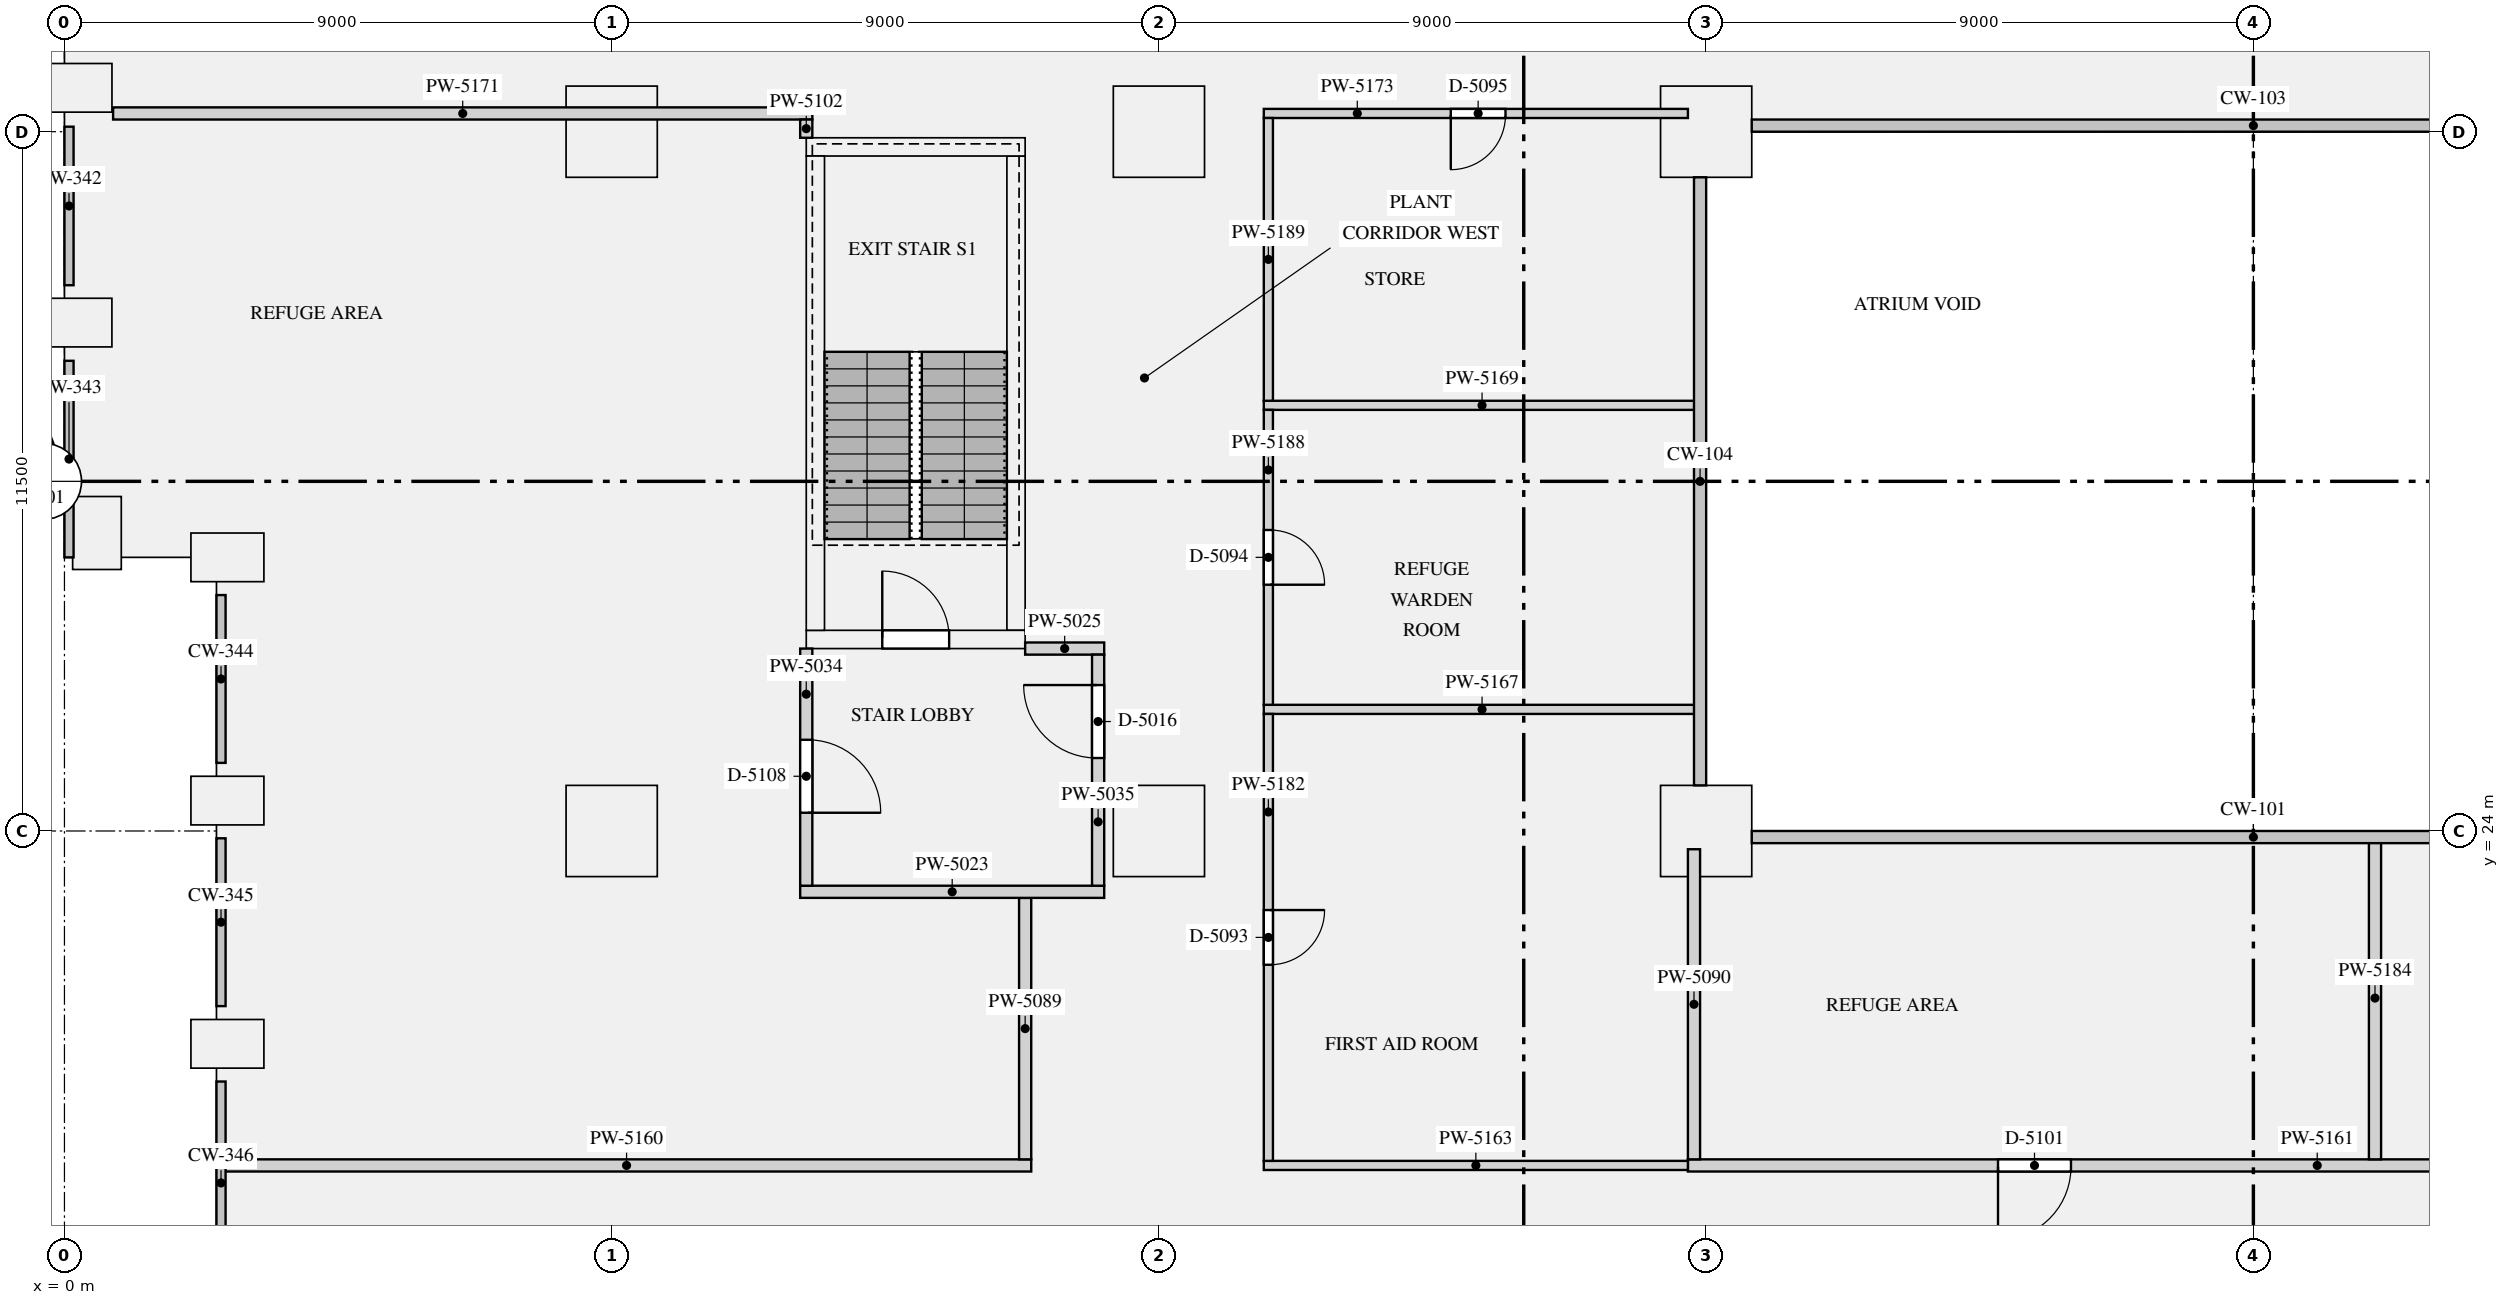
"""IFC4 building model, lengths in metres.
Left out: names, types, materials, properties, quantities, classifications, styles, units other than length and angle.
Written with IfcOpenShell. Run it as: python <this file> out.ifc"""

import sys

from ifc_helpers import new_model, si_unit, direction, frame, frame_2d, origin, origin_2d, place, context, subcontext, project, spatial, rectangle, extrude, element, fill, save


model = new_model("IFC4")
c1 = context("Model", 3, precision=1e-05, world=origin(), true_north=direction((0.0, 1.0)))
c2 = subcontext(c1, "Body", "Model", "MODEL_VIEW")
j1 = project(units=[si_unit("LENGTHUNIT", "METRE"), si_unit("PLANEANGLEUNIT", "RADIAN")], contexts=[c1])
p1 = place(None, origin())
s1 = spatial("IfcSite", under=j1, at=p1, CompositionType="ELEMENT")
p2 = place(p1, origin())
s2 = spatial("IfcBuilding", under=s1, at=p2, CompositionType="ELEMENT")
p3 = place(p2, frame((0.0, 0.0, 73.05)))
s3 = spatial("IfcBuildingStorey", under=s2, at=p3, CompositionType="ELEMENT", Elevation=73.05)
p4 = place(p3, frame((0.181, 36.221, -0.205), z_axis=(0.725881351267, 0.094569334257, 0.681287681454), x_axis=(-0.129190295435, 0.991619820075, 0.0)))
e1 = element("IfcColumn", 1, at=p4, inside=s3, PredefinedType="USERDEFINED", context=c2, shape_type="SweptSolid", body=[
    extrude(rectangle(XDim=1.2, YDim=0.8, at=origin_2d()), origin(), (0.0, 0.0, 1.0), 6.033),
])
p5 = place(p3, frame((0.18, 32.361, -0.206), z_axis=(0.728335596201, 0.047524851396, 0.683570514143), x_axis=(-0.065112840162, 0.997877907384, 0.0)))
e2 = element("IfcColumn", 2, at=p5, inside=s3, PredefinedType="USERDEFINED", context=c2, shape_type="SweptSolid", body=[
    extrude(rectangle(XDim=1.2, YDim=0.8, at=origin_2d()), origin(), (0.0, 0.0, 1.0), 6.016),
])
p6 = place(p3, frame((0.535, 28.9, -0.062), z_axis=(0.727229501578, -0.004075956346, 0.686382283144), x_axis=(-0.68637150257, 0.003846956532, 0.727240923894)))
e3 = element("IfcColumn", 3, at=p6, inside=s3, PredefinedType="USERDEFINED", context=c2, shape_type="SweptSolid", body=[
    extrude(rectangle(XDim=1.2, YDim=0.8, at=origin_2d()), origin(), (0.0, 0.0, 1.0), 5.571),
])
for number, where, z_axis, x_axis in (
    (4, (2.68, 28.5, -0.206), (0.729, 0.0, 0.684), (0.0, 1.0, 0.0)),
    (5, (2.68, 24.5, -0.206), (0.729, 0.0, 0.684), (0.0, 1.0, 0.0)),
    (6, (2.68, 20.5, -0.206), (0.729, 0.0, 0.684), (0.0, 1.0, 0.0)),
):
    element("IfcColumn", number, at=place(p3, frame(where, z_axis=z_axis, x_axis=x_axis)), inside=s3, PredefinedType="USERDEFINED", context=c2, shape_type="SweptSolid", body=[
        extrude(rectangle(XDim=1.2, YDim=0.8, at=origin_2d()), origin(), (0.0, 0.0, 1.0), 6.01),
    ])
for number, where, z_axis, x_axis in (
    (7, (9.0, 24.0, 0.0), (0.0, 0.0, 1.0), (1.0, 0.0, 0.0)),
    (8, (18.0, 24.0, 0.0), (0.0, 0.0, 1.0), (1.0, 0.0, 0.0)),
    (9, (27.0, 24.0, 0.0), (0.0, 0.0, 1.0), (1.0, 0.0, 0.0)),
    (10, (9.0, 35.5, 0.0), (0.0, 0.0, 1.0), (1.0, 0.0, 0.0)),
    (11, (18.0, 35.5, 0.0), (0.0, 0.0, 1.0), (1.0, 0.0, 0.0)),
    (12, (27.0, 35.5, 0.0), (0.0, 0.0, 1.0), (1.0, 0.0, 0.0)),
):
    element("IfcColumn", number, at=place(p3, frame(where, z_axis=z_axis, x_axis=x_axis)), inside=s3, PredefinedType="COLUMN", context=c2, shape_type="SweptSolid", body=[
        extrude(rectangle(XDim=1.5, YDim=1.5, at=origin_2d()), origin(), (0.0, 0.0, 1.0), 4.2),
    ])
p7 = place(p3, frame((12.2, 27.15, 0.0), z_axis=(0.0, 0.0, 1.0), x_axis=(1.0, 0.0, 0.0)))
e13 = element("IfcWall", 13, at=p7, inside=s3, PredefinedType="SHEAR", context=c2, shape_type="SweptSolid", body=[
    extrude(rectangle(XDim=3.6, YDim=0.3, at=frame_2d((1.8, 0.0))), origin(), (0.0, 0.0, 1.0), 4.2),
])
p8 = place(p7, frame((1.25, 0.0, 0.0)))
e14 = element("IfcOpeningElement", 14, at=p8, cuts=e13, PredefinedType="OPENING", context=c2, shape_type="SweptSolid", body=[
    extrude(rectangle(XDim=1.1, YDim=2.1, at=frame_2d((0.55, 1.05))), frame((0.0, 0.16, 0.0), z_axis=(0.0, -1.0, 0.0), x_axis=(1.0, 0.0, 0.0)), (0.0, 0.0, 1.0), 0.32),
])
p9 = place(p3, frame((12.2, 35.25, 0.0), z_axis=(0.0, 0.0, 1.0), x_axis=(1.0, 0.0, 0.0)))
e15 = element("IfcWall", 15, at=p9, inside=s3, PredefinedType="SHEAR", context=c2, shape_type="SweptSolid", body=[
    extrude(rectangle(XDim=3.6, YDim=0.3, at=frame_2d((1.8, 0.0))), origin(), (0.0, 0.0, 1.0), 4.2),
])
for number, where, z_axis, x_axis in (
    (16, (12.35, 27.3, 0.0), (0.0, 0.0, 1.0), (0.0, 1.0, 0.0)),
    (17, (15.65, 27.3, 0.0), (0.0, 0.0, 1.0), (0.0, 1.0, 0.0)),
):
    element("IfcWall", number, at=place(p3, frame(where, z_axis=z_axis, x_axis=x_axis)), inside=s3, PredefinedType="SHEAR", context=c2, shape_type="SweptSolid", body=[
        extrude(rectangle(XDim=7.8, YDim=0.3, at=frame_2d((3.9, 0.0))), origin(), (0.0, 0.0, 1.0), 4.2),
    ])
p10 = place(p3, frame((12.1, 23.0, 0.0), z_axis=(0.0, 0.0, 1.0), x_axis=(1.0, 0.0, 0.0)))
e18 = element("IfcWall", 18, at=p10, inside=s3, PredefinedType="PARTITIONING", context=c2, shape_type="SweptSolid", body=[
    extrude(rectangle(XDim=5.0, YDim=0.2, at=frame_2d((2.5, 0.0))), origin(), (0.0, 0.0, 1.0), 3.7),
])
p11 = place(p3, frame((15.8, 27.0, 0.0), z_axis=(0.0, 0.0, 1.0), x_axis=(1.0, 0.0, 0.0)))
e19 = element("IfcWall", 19, at=p11, inside=s3, PredefinedType="PARTITIONING", context=c2, shape_type="SweptSolid", body=[
    extrude(rectangle(XDim=1.3, YDim=0.2, at=frame_2d((0.65, 0.0))), origin(), (0.0, 0.0, 1.0), 3.7),
])
p12 = place(p3, frame((12.2, 23.1, 0.0), z_axis=(0.0, 0.0, 1.0), x_axis=(0.0, 1.0, 0.0)))
e20 = element("IfcWall", 20, at=p12, inside=s3, PredefinedType="PARTITIONING", context=c2, shape_type="SweptSolid", body=[
    extrude(rectangle(XDim=3.9, YDim=0.2, at=frame_2d((1.95, 0.0))), origin(), (0.0, 0.0, 1.0), 3.7),
])
p13 = place(p12, frame((1.2, 0.0, 0.0)))
e21 = element("IfcOpeningElement", 21, at=p13, cuts=e20, PredefinedType="OPENING", context=c2, shape_type="SweptSolid", body=[
    extrude(rectangle(XDim=1.2, YDim=2.1, at=frame_2d((0.6, 1.05))), frame((0.0, 0.11, 0.0), z_axis=(0.0, -1.0, 0.0), x_axis=(1.0, 0.0, 0.0)), (0.0, 0.0, 1.0), 0.22),
])
p14 = place(p3, frame((17.0, 23.1, 0.0), z_axis=(0.0, 0.0, 1.0), x_axis=(0.0, 1.0, 0.0)))
e22 = element("IfcWall", 22, at=p14, inside=s3, PredefinedType="PARTITIONING", context=c2, shape_type="SweptSolid", body=[
    extrude(rectangle(XDim=3.8, YDim=0.2, at=frame_2d((1.9, 0.0))), origin(), (0.0, 0.0, 1.0), 3.7),
])
p15 = place(p14, frame((2.1, 0.0, 0.0)))
e23 = element("IfcOpeningElement", 23, at=p15, cuts=e22, PredefinedType="OPENING", context=c2, shape_type="SweptSolid", body=[
    extrude(rectangle(XDim=1.2, YDim=2.1, at=frame_2d((0.6, 1.05))), frame((0.0, 0.11, 0.0), z_axis=(0.0, -1.0, 0.0), x_axis=(1.0, 0.0, 0.0)), (0.0, 0.0, 1.0), 0.22),
])
p16 = place(p3, frame((2.59, 18.5, 0.0), z_axis=(0.0, 0.0, 1.0), x_axis=(1.0, 0.0, 0.0)))
e24 = element("IfcWall", 24, at=p16, inside=s3, PredefinedType="PARTITIONING", context=c2, shape_type="SweptSolid", body=[
    extrude(rectangle(XDim=13.31, YDim=0.2, at=frame_2d((6.655, 0.0))), origin(), (0.0, 0.0, 1.0), 3.7),
])
p17 = place(p3, frame((26.7, 18.5, 0.0), z_axis=(0.0, 0.0, 1.0), x_axis=(1.0, 0.0, 0.0)))
e25 = element("IfcWall", 25, at=p17, inside=s3, PredefinedType="PARTITIONING", context=c2, shape_type="SweptSolid", body=[
    extrude(rectangle(XDim=18.6, YDim=0.2, at=frame_2d((9.3, 0.0))), origin(), (0.0, 0.0, 1.0), 3.7),
])
p18 = place(p17, frame((5.1, 0.0, 0.0)))
e26 = element("IfcOpeningElement", 26, at=p18, cuts=e25, PredefinedType="OPENING", context=c2, shape_type="SweptSolid", body=[
    extrude(rectangle(XDim=1.2, YDim=2.1, at=frame_2d((0.6, 1.05))), frame((0.0, 0.11, 0.0), z_axis=(0.0, -1.0, 0.0), x_axis=(1.0, 0.0, 0.0)), (0.0, 0.0, 1.0), 0.22),
])
p19 = place(p17, frame((14.4, 0.0, 0.0)))
e27 = element("IfcOpeningElement", 27, at=p19, cuts=e25, PredefinedType="OPENING", context=c2, shape_type="SweptSolid", body=[
    extrude(rectangle(XDim=1.0, YDim=2.1, at=frame_2d((0.5, 1.05))), frame((0.0, 0.11, 0.0), z_axis=(0.0, -1.0, 0.0), x_axis=(1.0, 0.0, 0.0)), (0.0, 0.0, 1.0), 0.22),
])
p20 = place(p3, frame((19.725, 18.5, 0.0), z_axis=(0.0, 0.0, 1.0), x_axis=(1.0, 0.0, 0.0)))
e28 = element("IfcWall", 28, at=p20, inside=s3, PredefinedType="PARTITIONING", context=c2, shape_type="SweptSolid", body=[
    extrude(rectangle(XDim=6.975, YDim=0.15, at=frame_2d((3.487, 0.0))), origin(), (0.0, 0.0, 1.0), 3.7),
])
for number, where, z_axis, x_axis in (
    (29, (19.725, 26.0, 0.0), (0.0, 0.0, 1.0), (1.0, 0.0, 0.0)),
    (30, (19.725, 31.0, 0.0), (0.0, 0.0, 1.0), (1.0, 0.0, 0.0)),
):
    element("IfcWall", number, at=place(p3, frame(where, z_axis=z_axis, x_axis=x_axis)), inside=s3, PredefinedType="PARTITIONING", context=c2, shape_type="SweptSolid", body=[
        extrude(rectangle(XDim=7.179, YDim=0.15, at=frame_2d((3.589, 0.0))), origin(), (0.0, 0.0, 1.0), 3.7),
    ])
p21 = place(p3, frame((0.8, 35.8, 0.0), z_axis=(0.0, 0.0, 1.0), x_axis=(1.0, 0.0, 0.0)))
e31 = element("IfcWall", 31, at=p21, inside=s3, PredefinedType="PARTITIONING", context=c2, shape_type="SweptSolid", body=[
    extrude(rectangle(XDim=11.5, YDim=0.2, at=frame_2d((5.75, 0.0))), origin(), (0.0, 0.0, 1.0), 3.7),
])
p22 = place(p3, frame((19.725, 35.8, 0.0), z_axis=(0.0, 0.0, 1.0), x_axis=(1.0, 0.0, 0.0)))
e32 = element("IfcWall", 32, at=p22, inside=s3, PredefinedType="PARTITIONING", context=c2, shape_type="SweptSolid", body=[
    extrude(rectangle(XDim=6.975, YDim=0.15, at=frame_2d((3.487, 0.0))), origin(), (0.0, 0.0, 1.0), 3.7),
])
p23 = place(p22, frame((3.075, 0.0, 0.0)))
e33 = element("IfcOpeningElement", 33, at=p23, cuts=e32, PredefinedType="OPENING", context=c2, shape_type="SweptSolid", body=[
    extrude(rectangle(XDim=0.9, YDim=2.1, at=frame_2d((0.45, 1.05))), frame((0.0, 0.085, 0.0), z_axis=(0.0, -1.0, 0.0), x_axis=(1.0, 0.0, 0.0)), (0.0, 0.0, 1.0), 0.17),
])
p24 = place(p3, frame((19.8, 18.575, 0.0), z_axis=(0.0, 0.0, 1.0), x_axis=(0.0, 1.0, 0.0)))
e34 = element("IfcWall", 34, at=p24, inside=s3, PredefinedType="PARTITIONING", context=c2, shape_type="SweptSolid", body=[
    extrude(rectangle(XDim=7.35, YDim=0.15, at=frame_2d((3.675, 0.0))), origin(), (0.0, 0.0, 1.0), 3.7),
])
p25 = place(p24, frame((3.225, 0.0, 0.0)))
e35 = element("IfcOpeningElement", 35, at=p25, cuts=e34, PredefinedType="OPENING", context=c2, shape_type="SweptSolid", body=[
    extrude(rectangle(XDim=0.9, YDim=2.1, at=frame_2d((0.45, 1.05))), frame((0.0, 0.085, 0.0), z_axis=(0.0, -1.0, 0.0), x_axis=(1.0, 0.0, 0.0)), (0.0, 0.0, 1.0), 0.17),
])
p26 = place(p3, frame((15.8, 18.6, 0.0), z_axis=(0.0, 0.0, 1.0), x_axis=(0.0, 1.0, 0.0)))
e36 = element("IfcWall", 36, at=p26, inside=s3, PredefinedType="PARTITIONING", context=c2, shape_type="SweptSolid", body=[
    extrude(rectangle(XDim=4.3, YDim=0.2, at=frame_2d((2.15, 0.0))), origin(), (0.0, 0.0, 1.0), 3.7),
])
p27 = place(p3, frame((26.8, 18.6, 0.0), z_axis=(0.0, 0.0, 1.0), x_axis=(0.0, 1.0, 0.0)))
e37 = element("IfcWall", 37, at=p27, inside=s3, PredefinedType="PARTITIONING", context=c2, shape_type="SweptSolid", body=[
    extrude(rectangle(XDim=5.1, YDim=0.2, at=frame_2d((2.55, 0.0))), origin(), (0.0, 0.0, 1.0), 3.7),
])
p28 = place(p3, frame((38.0, 18.6, 0.0), z_axis=(0.0, 0.0, 1.0), x_axis=(0.0, 1.0, 0.0)))
e38 = element("IfcWall", 38, at=p28, inside=s3, PredefinedType="PARTITIONING", context=c2, shape_type="SweptSolid", body=[
    extrude(rectangle(XDim=5.304, YDim=0.2, at=frame_2d((2.652, 0.0))), origin(), (0.0, 0.0, 1.0), 3.7),
])
p29 = place(p3, frame((19.8, 26.075, 0.0), z_axis=(0.0, 0.0, 1.0), x_axis=(0.0, 1.0, 0.0)))
e39 = element("IfcWall", 39, at=p29, inside=s3, PredefinedType="PARTITIONING", context=c2, shape_type="SweptSolid", body=[
    extrude(rectangle(XDim=4.85, YDim=0.15, at=frame_2d((2.425, 0.0))), origin(), (0.0, 0.0, 1.0), 3.7),
])
p30 = place(p29, frame((1.975, 0.0, 0.0)))
e40 = element("IfcOpeningElement", 40, at=p30, cuts=e39, PredefinedType="OPENING", context=c2, shape_type="SweptSolid", body=[
    extrude(rectangle(XDim=0.9, YDim=2.1, at=frame_2d((0.45, 1.05))), frame((0.0, 0.085, 0.0), z_axis=(0.0, -1.0, 0.0), x_axis=(1.0, 0.0, 0.0)), (0.0, 0.0, 1.0), 0.17),
])
p31 = place(p3, frame((19.8, 31.075, 0.0), z_axis=(0.0, 0.0, 1.0), x_axis=(0.0, 1.0, 0.0)))
e41 = element("IfcWall", 41, at=p31, inside=s3, PredefinedType="PARTITIONING", context=c2, shape_type="SweptSolid", body=[
    extrude(rectangle(XDim=4.65, YDim=0.15, at=frame_2d((2.325, 0.0))), origin(), (0.0, 0.0, 1.0), 3.7),
])
p32 = place(p3, frame((12.2, 35.4, 0.0), z_axis=(0.0, 0.0, 1.0), x_axis=(0.0, 1.0, 0.0)))
e42 = element("IfcWall", 42, at=p32, inside=s3, PredefinedType="PARTITIONING", context=c2, shape_type="SweptSolid", body=[
    extrude(rectangle(XDim=0.3, YDim=0.2, at=frame_2d((0.15, 0.0))), origin(), (0.0, 0.0, 1.0), 3.7),
])
p33 = place(p8, origin())
e43 = element("IfcDoor", 43, at=p33, inside=s3, OperationType="SINGLE_SWING_LEFT", PredefinedType="DOOR", context=c2, shape_type="SweptSolid", body=[
    extrude(rectangle(XDim=1.1, YDim=2.1, at=frame_2d((0.55, 1.05))), frame((0.0, 0.025, 0.0), z_axis=(0.0, -1.0, 0.0), x_axis=(1.0, 0.0, 0.0)), (0.0, 0.0, 1.0), 0.05),
])
fill(e14, e43)
p34 = place(p15, origin())
e44 = element("IfcDoor", 44, at=p34, inside=s3, OperationType="SINGLE_SWING_RIGHT", PredefinedType="DOOR", context=c2, shape_type="SweptSolid", body=[
    extrude(rectangle(XDim=1.2, YDim=2.1, at=frame_2d((0.6, 1.05))), frame((0.0, 0.025, 0.0), z_axis=(0.0, -1.0, 0.0), x_axis=(1.0, 0.0, 0.0)), (0.0, 0.0, 1.0), 0.05),
])
fill(e23, e44)
p35 = place(p25, frame((0.9, 0.0, 0.0), z_axis=(0.0, 0.0, 1.0), x_axis=(-1.0, 0.0, 0.0)))
e45 = element("IfcDoor", 45, at=p35, inside=s3, OperationType="SINGLE_SWING_LEFT", PredefinedType="DOOR", context=c2, shape_type="SweptSolid", body=[
    extrude(rectangle(XDim=0.9, YDim=2.1, at=frame_2d((0.45, 1.05))), frame((0.0, 0.025, 0.0), z_axis=(0.0, -1.0, 0.0), x_axis=(1.0, 0.0, 0.0)), (0.0, 0.0, 1.0), 0.05),
])
fill(e35, e45)
p36 = place(p30, frame((0.9, 0.0, 0.0), z_axis=(0.0, 0.0, 1.0), x_axis=(-1.0, 0.0, 0.0)))
e46 = element("IfcDoor", 46, at=p36, inside=s3, OperationType="SINGLE_SWING_RIGHT", PredefinedType="DOOR", context=c2, shape_type="SweptSolid", body=[
    extrude(rectangle(XDim=0.9, YDim=2.1, at=frame_2d((0.45, 1.05))), frame((0.0, 0.025, 0.0), z_axis=(0.0, -1.0, 0.0), x_axis=(1.0, 0.0, 0.0)), (0.0, 0.0, 1.0), 0.05),
])
fill(e40, e46)
p37 = place(p23, frame((0.9, 0.0, 0.0), z_axis=(0.0, 0.0, 1.0), x_axis=(-1.0, 0.0, 0.0)))
e47 = element("IfcDoor", 47, at=p37, inside=s3, OperationType="SINGLE_SWING_RIGHT", PredefinedType="DOOR", context=c2, shape_type="SweptSolid", body=[
    extrude(rectangle(XDim=0.9, YDim=2.1, at=frame_2d((0.45, 1.05))), frame((0.0, 0.025, 0.0), z_axis=(0.0, -1.0, 0.0), x_axis=(1.0, 0.0, 0.0)), (0.0, 0.0, 1.0), 0.05),
])
fill(e33, e47)
p38 = place(p18, frame((1.2, 0.0, 0.0), z_axis=(0.0, 0.0, 1.0), x_axis=(-1.0, 0.0, 0.0)))
e48 = element("IfcDoor", 48, at=p38, inside=s3, OperationType="SINGLE_SWING_RIGHT", PredefinedType="DOOR", context=c2, shape_type="SweptSolid", body=[
    extrude(rectangle(XDim=1.2, YDim=2.1, at=frame_2d((0.6, 1.05))), frame((0.0, 0.025, 0.0), z_axis=(0.0, -1.0, 0.0), x_axis=(1.0, 0.0, 0.0)), (0.0, 0.0, 1.0), 0.05),
])
fill(e26, e48)
p39 = place(p13, frame((1.2, 0.0, 0.0), z_axis=(0.0, 0.0, 1.0), x_axis=(-1.0, 0.0, 0.0)))
e49 = element("IfcDoor", 49, at=p39, inside=s3, OperationType="SINGLE_SWING_RIGHT", PredefinedType="DOOR", context=c2, shape_type="SweptSolid", body=[
    extrude(rectangle(XDim=1.2, YDim=2.1, at=frame_2d((0.6, 1.05))), frame((0.0, 0.025, 0.0), z_axis=(0.0, -1.0, 0.0), x_axis=(1.0, 0.0, 0.0)), (0.0, 0.0, 1.0), 0.05),
])
fill(e21, e49)
save(model, sys.argv[1])
